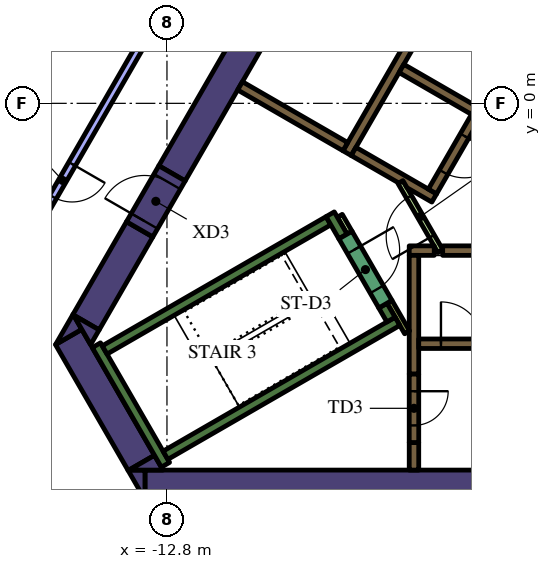
"""IFC4 building model, lengths in metres.
Left out: names, types, materials, properties, quantities, classifications, styles, units other than length and angle.
Written with IfcOpenShell. Run it as: python <this file> out.ifc"""

import sys

from ifc_helpers import new_model, si_unit, direction, frame, frame_2d, origin, place, context, subcontext, project, spatial, polyline, rectangle, outline, extrude, element, fill, save


model = new_model("IFC4")
c1 = context("Model", 3, precision=1e-05, world=origin(), true_north=direction((0.0, 1.0)))
c2 = subcontext(c1, "Body", "Model", "MODEL_VIEW")
j1 = project(units=[si_unit("LENGTHUNIT", "METRE"), si_unit("PLANEANGLEUNIT", "RADIAN")], contexts=[c1])
p1 = place(None, origin())
s1 = spatial("IfcSite", under=j1, at=p1, CompositionType="ELEMENT")
p2 = place(p1, origin())
s2 = spatial("IfcBuilding", under=s1, at=p2, CompositionType="ELEMENT")
p3 = place(p2, frame((0.0, 0.0, 162.6)))
s3 = spatial("IfcBuildingStorey", under=s2, at=p3, CompositionType="ELEMENT", Elevation=162.6)
p4 = place(p3, frame((-13.378, -10.05, 0.0), z_axis=(0.0, 0.0, 1.0), x_axis=(1.0, 0.0, 0.0)))
e1 = element("IfcWall", 1, at=p4, inside=s3, PredefinedType="SOLIDWALL", context=c2, shape_type="SweptSolid", body=[
    extrude(rectangle(XDim=22.282, YDim=0.8, at=frame_2d((11.141, 0.0))), origin(), (0.0, 0.0, 1.0), 4.2),
])
p5 = place(p3, origin())
e2 = element("IfcWall", 2, at=p5, inside=s3, PredefinedType="SOLIDWALL", context=c2, shape_type="SweptSolid", body=[
    extrude(outline(polyline([(-13.828, -9.65), (-13.38, -9.65), (-13.38, -10.426), (-13.828, -9.65)])), origin(), (0.0, 0.0, 1.0), 4.2),
])
p6 = place(p3, frame((-15.387, -6.148, 0.0), z_axis=(0.0, 0.0, 1.0), x_axis=(0.499984020225, -0.866034629516, 0.0)))
e3 = element("IfcWall", 3, at=p6, inside=s3, PredefinedType="SOLIDWALL", context=c2, shape_type="SweptSolid", body=[
    extrude(rectangle(XDim=3.824, YDim=0.8, at=frame_2d((1.912, 0.0))), origin(), (0.0, 0.0, 1.0), 4.2),
])
e4 = element("IfcWall", 4, at=p5, inside=s3, PredefinedType="SOLIDWALL", context=c2, shape_type="SweptSolid", body=[
    extrude(outline(polyline([(-15.042, -5.947), (-15.729, -6.343), (-15.271, -5.55), (-15.042, -5.947)])), origin(), (0.0, 0.0, 1.0), 4.2),
])
e5 = element("IfcWall", 5, at=p5, inside=s3, PredefinedType="SOLIDWALL", context=c2, shape_type="SweptSolid", body=[
    extrude(outline(polyline([(-12.904, -9.65), (-13.8, -9.65), (-13.128, -9.262), (-12.904, -9.65)])), origin(), (0.0, 0.0, 1.0), 4.2),
])
p7 = place(p3, frame((-13.518, -3.314, 0.0), z_axis=(0.0, 0.0, 1.0), x_axis=(-0.499969377405, -0.866043083026, 0.0)))
e6 = element("IfcWall", 6, at=p7, inside=s3, PredefinedType="SOLIDWALL", context=c2, shape_type="SweptSolid", body=[
    extrude(rectangle(XDim=2.824, YDim=0.8, at=frame_2d((1.412, 0.0))), origin(), (0.0, 0.0, 1.0), 4.2),
])
e7 = element("IfcWall", 7, at=p5, inside=s3, PredefinedType="SOLIDWALL", context=c2, shape_type="SweptSolid", body=[
    extrude(outline(polyline([(-14.809, -6.35), (-15.257, -5.574), (-14.585, -5.962), (-14.809, -6.35)])), origin(), (0.0, 0.0, 1.0), 4.2),
])
p8 = place(p3, frame((-12.668, -1.842, 0.0), z_axis=(0.0, 0.0, 1.0), x_axis=(0.500003640647, 0.866023301845, 0.0)))
e8 = element("IfcWall", 8, at=p8, inside=s3, PredefinedType="SOLIDWALL", context=c2, shape_type="SweptSolid", body=[
    extrude(rectangle(XDim=15.858, YDim=0.8, at=frame_2d((7.929, 0.0))), origin(), (0.0, 0.0, 1.0), 4.2),
])
p9 = place(p3, frame((-12.84, -9.511, 0.0), z_axis=(0.0, 0.0, 1.0), x_axis=(-0.499997733992, 0.866026712061, 0.0)))
e9 = element("IfcWall", 9, at=p9, inside=s3, PredefinedType="SOLIDWALL", context=c2, shape_type="SweptSolid", body=[
    extrude(rectangle(XDim=3.634, YDim=0.25, at=frame_2d((1.817, 0.0))), origin(), (0.0, 0.0, 1.0), 4.2),
])
p10 = place(p3, frame((-14.44, -6.49, 0.0), z_axis=(0.0, 0.0, 1.0), x_axis=(0.866022966069, 0.500004222222, 0.0)))
e10 = element("IfcWall", 10, at=p10, inside=s3, PredefinedType="SOLIDWALL", context=c2, shape_type="SweptSolid", body=[
    extrude(rectangle(XDim=6.8, YDim=0.25, at=frame_2d((3.4, 0.0))), origin(), (0.0, 0.0, 1.0), 4.2),
])
p11 = place(p3, frame((-8.168, -3.503, 0.0), z_axis=(0.0, 0.0, 1.0), x_axis=(-0.499952099219, 0.866053057547, 0.0)))
e11 = element("IfcWall", 11, at=p11, inside=s3, PredefinedType="SOLIDWALL", context=c2, shape_type="SweptSolid", body=[
    extrude(rectangle(XDim=0.675, YDim=0.25, at=frame_2d((0.337, 0.0))), origin(), (0.0, 0.0, 1.0), 4.2),
])
p12 = place(p3, frame((-12.84, -9.261, 0.0), z_axis=(0.0, 0.0, 1.0), x_axis=(0.866016039709, 0.500016218704, 0.0)))
e12 = element("IfcWall", 12, at=p12, inside=s3, PredefinedType="SOLIDWALL", context=c2, shape_type="SweptSolid", body=[
    extrude(rectangle(XDim=7.05, YDim=0.25, at=frame_2d((3.525, 0.0))), origin(), (0.0, 0.0, 1.0), 4.2),
])
p13 = place(p3, frame((-6.905, -5.69, 0.0), z_axis=(0.0, 0.0, 1.0), x_axis=(-0.500402024738, 0.865793170242, 0.0)))
e13 = element("IfcWall", 13, at=p13, inside=s3, PredefinedType="SOLIDWALL", context=c2, shape_type="SweptSolid", body=[
    extrude(rectangle(XDim=0.425, YDim=0.25, at=frame_2d((0.212, 0.0))), origin(), (0.0, 0.0, 1.0), 4.2),
])
p14 = place(p3, frame((-6.3, -8.925, 0.0), z_axis=(0.0, 0.0, 1.0), x_axis=(0.0, -1.0, 0.0)))
e14 = element("IfcWall", 14, at=p14, inside=s3, PredefinedType="SOLIDWALL", context=c2, shape_type="SweptSolid", body=[
    extrude(rectangle(XDim=0.725, YDim=0.25, at=frame_2d((0.363, 0.0))), origin(), (0.0, 0.0, 1.0), 4.2),
])
p15 = place(p3, frame((-5.545, -3.875, 0.0), z_axis=(0.0, 0.0, 1.0), x_axis=(1.0, 0.0, 0.0)))
e15 = element("IfcWall", 15, at=p15, inside=s3, PredefinedType="SOLIDWALL", context=c2, shape_type="SweptSolid", body=[
    extrude(rectangle(XDim=11.97, YDim=0.25, at=frame_2d((5.985, 0.0))), origin(), (0.0, 0.0, 1.0), 4.2),
])
p16 = place(p3, frame((-6.425, -3.875, 0.0), z_axis=(0.0, 0.0, 1.0), x_axis=(1.0, 0.0, 0.0)))
e16 = element("IfcWall", 16, at=p16, inside=s3, PredefinedType="SOLIDWALL", context=c2, shape_type="SweptSolid", body=[
    extrude(rectangle(XDim=0.658, YDim=0.25, at=frame_2d((0.329, 0.0))), origin(), (0.0, 0.0, 1.0), 4.2),
])
p17 = place(p3, frame((-6.3, -7.125, 0.0), z_axis=(0.0, 0.0, 1.0), x_axis=(0.0, 1.0, 0.0)))
e17 = element("IfcWall", 17, at=p17, inside=s3, PredefinedType="SOLIDWALL", context=c2, shape_type="SweptSolid", body=[
    extrude(rectangle(XDim=3.125, YDim=0.25, at=frame_2d((1.562, 0.0))), origin(), (0.0, 0.0, 1.0), 4.2),
])
p18 = place(p3, frame((-8.06, -1.311, 0.0), z_axis=(0.0, 0.0, 1.0), x_axis=(0.50000273126, 0.866023826885, 0.0)))
e18 = element("IfcWall", 18, at=p18, inside=s3, PredefinedType="SOLIDWALL", context=c2, shape_type="SweptSolid", body=[
    extrude(rectangle(XDim=10.33, YDim=0.25, at=frame_2d((5.165, 0.0))), origin(), (0.0, 0.0, 1.0), 4.2),
])
p19 = place(p3, frame((-4.724, -0.182, 0.0), z_axis=(0.0, 0.0, 1.0), x_axis=(-0.866008176907, 0.50002983664, 0.0)))
e19 = element("IfcWall", 19, at=p19, inside=s3, PredefinedType="SOLIDWALL", context=c2, shape_type="SweptSolid", body=[
    extrude(rectangle(XDim=2.2, YDim=0.25, at=frame_2d((1.1, 0.0))), origin(), (0.0, 0.0, 1.0), 4.2),
])
e20 = element("IfcWall", 20, at=p5, inside=s3, PredefinedType="SOLIDWALL", context=c2, shape_type="SweptSolid", body=[
    extrude(outline(polyline([(-5.922, -2.257), (-5.922, -2.257), (-5.705, -2.382), (-5.83, -2.598), (-6.483, -2.221), (-6.591, -2.033), (-6.591, -2.033), (-6.7, -2.096), (-7.952, -1.373), (-7.827, -1.156), (-5.922, -2.257)])), origin(), (0.0, 0.0, 1.0), 4.2),
])
p20 = place(p3, frame((-8.106, -1.14, 0.0), z_axis=(0.0, 0.0, 1.0), x_axis=(-0.866008981251, 0.500028443584, 0.0)))
e21 = element("IfcWall", 21, at=p20, inside=s3, PredefinedType="SOLIDWALL", context=c2, shape_type="SweptSolid", body=[
    extrude(rectangle(XDim=3.2, YDim=0.25, at=frame_2d((1.6, 0.0))), origin(), (0.0, 0.0, 1.0), 4.2),
])
p21 = place(p3, frame((-8.252, -2.958, 0.0), z_axis=(0.0, 0.0, 1.0), x_axis=(0.500174715838, -0.865924508047, 0.0)))
e22 = element("IfcWall", 22, at=p21, inside=s3, PredefinedType="PARTITIONING", context=c2, shape_type="SweptSolid", body=[
    extrude(rectangle(XDim=0.514, YDim=0.15, at=frame_2d((0.257, 0.0))), origin(), (0.0, 0.0, 1.0), 3.15),
])
p22 = place(p3, frame((-6.48, -6.027, 0.0), z_axis=(0.0, 0.0, 1.0), x_axis=(-0.499927229454, 0.866067413802, 0.0)))
e23 = element("IfcWall", 23, at=p22, inside=s3, PredefinedType="PARTITIONING", context=c2, shape_type="SweptSolid", body=[
    extrude(rectangle(XDim=0.929, YDim=0.15, at=frame_2d((0.464, 0.0))), origin(), (0.0, 0.0, 1.0), 4.2),
])
p23 = place(p3, frame((-6.175, -6.325, 0.0), z_axis=(0.0, 0.0, 1.0), x_axis=(1.0, 0.0, 0.0)))
e24 = element("IfcWall", 24, at=p23, inside=s3, PredefinedType="SOLIDWALL", context=c2, shape_type="SweptSolid", body=[
    extrude(rectangle(XDim=12.35, YDim=0.25, at=frame_2d((6.175, 0.0))), origin(), (0.0, 0.0, 1.0), 4.2),
])
p24 = place(p23, frame((0.585, 0.0, 0.0)))
e25 = element("IfcOpeningElement", 25, at=p24, cuts=e24, PredefinedType="OPENING", context=c2, shape_type="SweptSolid", body=[
    extrude(rectangle(XDim=1.1, YDim=2.1, at=frame_2d((0.55, 1.05))), frame((0.0, 0.135, 0.0), z_axis=(0.0, -1.0, 0.0), x_axis=(1.0, 0.0, 0.0)), (0.0, 0.0, 1.0), 0.27),
])
p25 = place(p23, frame((3.105, 0.0, 0.0)))
e26 = element("IfcOpeningElement", 26, at=p25, cuts=e24, PredefinedType="OPENING", context=c2, shape_type="SweptSolid", body=[
    extrude(rectangle(XDim=1.1, YDim=2.1, at=frame_2d((0.55, 1.05))), frame((0.0, 0.135, 0.0), z_axis=(0.0, -1.0, 0.0), x_axis=(1.0, 0.0, 0.0)), (0.0, 0.0, 1.0), 0.27),
])
p26 = place(p23, frame((5.625, 0.0, 0.0)))
e27 = element("IfcOpeningElement", 27, at=p26, cuts=e24, PredefinedType="OPENING", context=c2, shape_type="SweptSolid", body=[
    extrude(rectangle(XDim=1.1, YDim=2.1, at=frame_2d((0.55, 1.05))), frame((0.0, 0.135, 0.0), z_axis=(0.0, -1.0, 0.0), x_axis=(1.0, 0.0, 0.0)), (0.0, 0.0, 1.0), 0.27),
])
p27 = place(p23, frame((8.145, 0.0, 0.0)))
e28 = element("IfcOpeningElement", 28, at=p27, cuts=e24, PredefinedType="OPENING", context=c2, shape_type="SweptSolid", body=[
    extrude(rectangle(XDim=1.1, YDim=2.1, at=frame_2d((0.55, 1.05))), frame((0.0, 0.135, 0.0), z_axis=(0.0, -1.0, 0.0), x_axis=(1.0, 0.0, 0.0)), (0.0, 0.0, 1.0), 0.27),
])
p28 = place(p23, frame((10.665, 0.0, 0.0)))
e29 = element("IfcOpeningElement", 29, at=p28, cuts=e24, PredefinedType="OPENING", context=c2, shape_type="SweptSolid", body=[
    extrude(rectangle(XDim=1.1, YDim=2.1, at=frame_2d((0.55, 1.05))), frame((0.0, 0.135, 0.0), z_axis=(0.0, -1.0, 0.0), x_axis=(1.0, 0.0, 0.0)), (0.0, 0.0, 1.0), 0.27),
])
p29 = place(p3, frame((-0.898, 6.194, 0.0), z_axis=(0.0, 0.0, 1.0), x_axis=(-0.499996202215, -0.866027596426, 0.0)))
e30 = element("IfcWall", 30, at=p29, inside=s3, PredefinedType="SOLIDWALL", context=c2, shape_type="SweptSolid", body=[
    extrude(rectangle(XDim=9.83, YDim=0.25, at=frame_2d((4.915, 0.0))), origin(), (0.0, 0.0, 1.0), 4.2),
])
p30 = place(p29, frame((0.585, 0.0, 0.0)))
e31 = element("IfcOpeningElement", 31, at=p30, cuts=e30, PredefinedType="OPENING", context=c2, shape_type="SweptSolid", body=[
    extrude(rectangle(XDim=1.1, YDim=2.1, at=frame_2d((0.55, 1.05))), frame((0.0, 0.135, 0.0), z_axis=(0.0, -1.0, 0.0), x_axis=(1.0, 0.0, 0.0)), (0.0, 0.0, 1.0), 0.27),
])
p31 = place(p29, frame((3.105, 0.0, 0.0)))
e32 = element("IfcOpeningElement", 32, at=p31, cuts=e30, PredefinedType="OPENING", context=c2, shape_type="SweptSolid", body=[
    extrude(rectangle(XDim=1.1, YDim=2.1, at=frame_2d((0.55, 1.05))), frame((0.0, 0.135, 0.0), z_axis=(0.0, -1.0, 0.0), x_axis=(1.0, 0.0, 0.0)), (0.0, 0.0, 1.0), 0.27),
])
p32 = place(p29, frame((5.625, 0.0, 0.0)))
e33 = element("IfcOpeningElement", 33, at=p32, cuts=e30, PredefinedType="OPENING", context=c2, shape_type="SweptSolid", body=[
    extrude(rectangle(XDim=1.1, YDim=2.1, at=frame_2d((0.55, 1.05))), frame((0.0, 0.135, 0.0), z_axis=(0.0, -1.0, 0.0), x_axis=(1.0, 0.0, 0.0)), (0.0, 0.0, 1.0), 0.27),
])
p33 = place(p29, frame((8.145, 0.0, 0.0)))
e34 = element("IfcOpeningElement", 34, at=p33, cuts=e30, PredefinedType="OPENING", context=c2, shape_type="SweptSolid", body=[
    extrude(rectangle(XDim=1.1, YDim=2.1, at=frame_2d((0.55, 1.05))), frame((0.0, 0.135, 0.0), z_axis=(0.0, -1.0, 0.0), x_axis=(1.0, 0.0, 0.0)), (0.0, 0.0, 1.0), 0.27),
])
p34 = place(p3, frame((-8.103, -3.466, 0.0), z_axis=(0.0, 0.0, 1.0), x_axis=(0.500078061341, -0.865980330357, 0.0)))
e35 = element("IfcWall", 35, at=p34, inside=s3, PredefinedType="SOLIDWALL", context=c2, shape_type="SweptSolid", body=[
    extrude(rectangle(XDim=2.1, YDim=0.4, at=frame_2d((1.05, 0.0))), origin(), (0.0, 0.0, 1.0), 4.2),
])
p35 = place(p34, frame((0.45, 0.0, 0.0)))
e36 = element("IfcOpeningElement", 36, at=p35, cuts=e35, PredefinedType="OPENING", context=c2, shape_type="SweptSolid", body=[
    extrude(rectangle(XDim=1.2, YDim=2.1, at=frame_2d((0.6, 1.05))), frame((0.0, 0.21, 0.0), z_axis=(0.0, -1.0, 0.0), x_axis=(1.0, 0.0, 0.0)), (0.0, 0.0, 1.0), 0.42),
])
p36 = place(p3, frame((-6.3, -7.125, 0.0), z_axis=(0.0, 0.0, 1.0), x_axis=(0.0, -1.0, 0.0)))
e37 = element("IfcWall", 37, at=p36, inside=s3, PredefinedType="SOLIDWALL", context=c2, shape_type="SweptSolid", body=[
    extrude(rectangle(XDim=1.8, YDim=0.25, at=frame_2d((0.9, 0.0))), origin(), (0.0, 0.0, 1.0), 4.2),
])
p37 = place(p36, frame((0.45, 0.0, 0.0)))
e38 = element("IfcOpeningElement", 38, at=p37, cuts=e37, PredefinedType="OPENING", context=c2, shape_type="SweptSolid", body=[
    extrude(rectangle(XDim=0.9, YDim=2.1, at=frame_2d((0.45, 1.05))), frame((0.0, 0.135, 0.0), z_axis=(0.0, -1.0, 0.0), x_axis=(1.0, 0.0, 0.0)), (0.0, 0.0, 1.0), 0.27),
])
p38 = place(p3, frame((-5.606, -3.89, 0.0), z_axis=(0.0, 0.0, 1.0), x_axis=(-0.500027713859, 0.866009402589, 0.0)))
e39 = element("IfcWall", 39, at=p38, inside=s3, PredefinedType="PARTITIONING", context=c2, shape_type="SweptSolid", body=[
    extrude(rectangle(XDim=2.1, YDim=0.15, at=frame_2d((1.05, 0.0))), origin(), (0.0, 0.0, 1.0), 3.15),
])
p39 = place(p38, frame((0.45, 0.0, 0.0)))
e40 = element("IfcOpeningElement", 40, at=p39, cuts=e39, PredefinedType="OPENING", context=c2, shape_type="SweptSolid", body=[
    extrude(rectangle(XDim=1.2, YDim=2.1, at=frame_2d((0.6, 1.05))), frame((0.0, 0.085, 0.0), z_axis=(0.0, -1.0, 0.0), x_axis=(1.0, 0.0, 0.0)), (0.0, 0.0, 1.0), 0.17),
])
p40 = place(p3, frame((-13.518, -3.314, 0.0), z_axis=(0.0, 0.0, 1.0), x_axis=(0.500062241894, 0.865989465428, 0.0)))
e41 = element("IfcWall", 41, at=p40, inside=s3, PredefinedType="SOLIDWALL", context=c2, shape_type="SweptSolid", body=[
    extrude(rectangle(XDim=1.7, YDim=0.8, at=frame_2d((0.85, 0.0))), origin(), (0.0, 0.0, 1.0), 4.2),
])
p41 = place(p40, frame((0.25, 0.0, 0.0)))
e42 = element("IfcOpeningElement", 42, at=p41, cuts=e41, PredefinedType="OPENING", context=c2, shape_type="SweptSolid", body=[
    extrude(rectangle(XDim=1.2, YDim=2.1, at=frame_2d((0.6, 1.05))), frame((0.0, 0.41, 0.0), z_axis=(0.0, -1.0, 0.0), x_axis=(1.0, 0.0, 0.0)), (0.0, 0.0, 1.0), 0.82),
])
p42 = place(p3, frame((-13.047, 2.302, 0.0), z_axis=(0.0, 0.0, 1.0), x_axis=(-0.499986873641, -0.866032982159, 0.0)))
e43 = element("IfcWall", 43, at=p42, inside=s3, PredefinedType="PARTITIONING", context=c2, shape_type="SweptSolid", body=[
    extrude(rectangle(XDim=9.99, YDim=0.2, at=frame_2d((4.995, 0.0))), origin(), (0.0, 0.0, 1.0), 3.15),
])
p43 = place(p42, frame((4.5, 0.0, 0.0)))
e44 = element("IfcOpeningElement", 44, at=p43, cuts=e43, PredefinedType="OPENING", context=c2, shape_type="SweptSolid", body=[
    extrude(rectangle(XDim=1.0, YDim=2.1, at=frame_2d((0.5, 1.05))), frame((0.0, 0.11, 0.0), z_axis=(0.0, -1.0, 0.0), x_axis=(1.0, 0.0, 0.0)), (0.0, 0.0, 1.0), 0.22),
])
p44 = place(p24, origin())
e45 = element("IfcDoor", 45, at=p44, inside=s3, OperationType="DOUBLE_DOOR_SLIDING", PredefinedType="DOOR", context=c2, shape_type="SweptSolid", body=[
    extrude(rectangle(XDim=1.1, YDim=2.1, at=frame_2d((0.55, 1.05))), frame((0.0, 0.025, 0.0), z_axis=(0.0, -1.0, 0.0), x_axis=(1.0, 0.0, 0.0)), (0.0, 0.0, 1.0), 0.05),
])
fill(e25, e45)
p45 = place(p33, origin())
e46 = element("IfcDoor", 46, at=p45, inside=s3, OperationType="DOUBLE_DOOR_SLIDING", PredefinedType="DOOR", context=c2, shape_type="SweptSolid", body=[
    extrude(rectangle(XDim=1.1, YDim=2.1, at=frame_2d((0.55, 1.05))), frame((0.0, 0.025, 0.0), z_axis=(0.0, -1.0, 0.0), x_axis=(1.0, 0.0, 0.0)), (0.0, 0.0, 1.0), 0.05),
])
fill(e34, e46)
p46 = place(p35, origin())
e47 = element("IfcDoor", 47, at=p46, inside=s3, OperationType="SINGLE_SWING_LEFT", PredefinedType="DOOR", context=c2, shape_type="SweptSolid", body=[
    extrude(rectangle(XDim=1.2, YDim=2.1, at=frame_2d((0.6, 1.05))), frame((0.0, 0.025, 0.0), z_axis=(0.0, -1.0, 0.0), x_axis=(1.0, 0.0, 0.0)), (0.0, 0.0, 1.0), 0.05),
])
fill(e36, e47)
p47 = place(p37, origin())
e48 = element("IfcDoor", 48, at=p47, inside=s3, OperationType="SINGLE_SWING_LEFT", PredefinedType="DOOR", context=c2, shape_type="SweptSolid", body=[
    extrude(rectangle(XDim=0.9, YDim=2.1, at=frame_2d((0.45, 1.05))), frame((0.0, 0.025, 0.0), z_axis=(0.0, -1.0, 0.0), x_axis=(1.0, 0.0, 0.0)), (0.0, 0.0, 1.0), 0.05),
])
fill(e38, e48)
p48 = place(p39, origin())
e49 = element("IfcDoor", 49, at=p48, inside=s3, OperationType="SINGLE_SWING_LEFT", PredefinedType="DOOR", context=c2, shape_type="SweptSolid", body=[
    extrude(rectangle(XDim=1.2, YDim=2.1, at=frame_2d((0.6, 1.05))), frame((0.0, 0.025, 0.0), z_axis=(0.0, -1.0, 0.0), x_axis=(1.0, 0.0, 0.0)), (0.0, 0.0, 1.0), 0.05),
])
fill(e40, e49)
p49 = place(p41, origin())
e50 = element("IfcDoor", 50, at=p49, inside=s3, OperationType="SINGLE_SWING_LEFT", PredefinedType="DOOR", context=c2, shape_type="SweptSolid", body=[
    extrude(rectangle(XDim=1.2, YDim=2.1, at=frame_2d((0.6, 1.05))), frame((0.0, 0.025, 0.0), z_axis=(0.0, -1.0, 0.0), x_axis=(1.0, 0.0, 0.0)), (0.0, 0.0, 1.0), 0.05),
])
fill(e42, e50)
p50 = place(p43, origin())
e51 = element("IfcDoor", 51, at=p50, inside=s3, OperationType="SINGLE_SWING_RIGHT", PredefinedType="DOOR", context=c2, shape_type="SweptSolid", body=[
    extrude(rectangle(XDim=1.0, YDim=2.1, at=frame_2d((0.5, 1.05))), frame((0.0, 0.025, 0.0), z_axis=(0.0, -1.0, 0.0), x_axis=(1.0, 0.0, 0.0)), (0.0, 0.0, 1.0), 0.05),
])
fill(e44, e51)
save(model, sys.argv[1])
